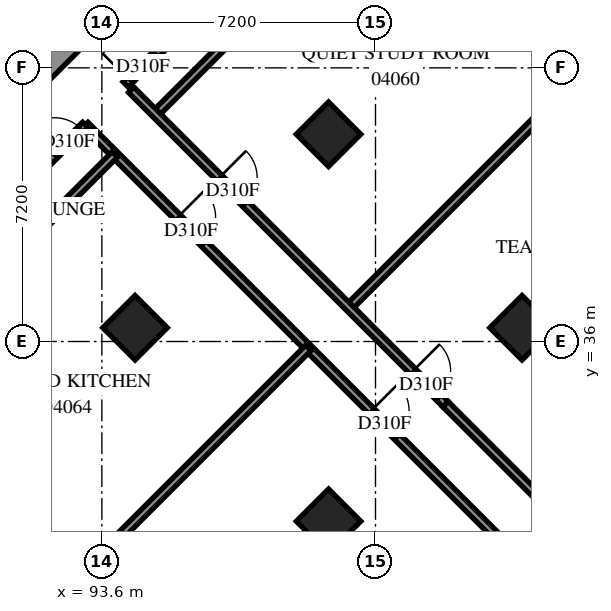
"""IFC4 building model, lengths in metres.
Left out: names, types, materials, properties, quantities, classifications, styles, units other than length and angle.
Written with IfcOpenShell. Run it as: python <this file> out.ifc"""

import sys

from ifc_helpers import new_model, si_unit, direction, frame, frame_2d, origin, origin_2d, place, context, subcontext, project, spatial, polyline, rectangle, outline, extrude, element, fill, save


model = new_model("IFC4")
c1 = context("Model", 3, precision=1e-05, world=origin(), true_north=direction((0.0, 1.0)))
c2 = subcontext(c1, "Body", "Model", "MODEL_VIEW")
j1 = project(units=[si_unit("LENGTHUNIT", "METRE"), si_unit("PLANEANGLEUNIT", "RADIAN")], contexts=[c1])
p1 = place(None, origin())
s1 = spatial("IfcSite", under=j1, at=p1, CompositionType="ELEMENT")
p2 = place(p1, origin())
s2 = spatial("IfcBuilding", under=s1, at=p2, CompositionType="ELEMENT")
p3 = place(p2, frame((0.0, 0.0, 18.6)))
s3 = spatial("IfcBuildingStorey", under=s2, at=p3, CompositionType="ELEMENT", Elevation=18.6)
for number, where, z_axis, x_axis in (
    (1, (99.565, 41.453, 0.0), (0.0, 0.0, 1.0), (0.707, -0.707, 0.0)),
    (2, (94.474, 36.362, 0.0), (0.0, 0.0, 1.0), (0.707, -0.707, 0.0)),
    (3, (104.656, 36.362, 0.0), (0.0, 0.0, 1.0), (0.707, -0.707, 0.0)),
    (4, (99.565, 31.271, 0.0), (0.0, 0.0, 1.0), (0.707, -0.707, 0.0)),
):
    element("IfcColumn", number, at=place(p3, frame(where, z_axis=z_axis, x_axis=x_axis)), inside=s3, PredefinedType="COLUMN", context=c2, shape_type="SweptSolid", body=[
        extrude(rectangle(XDim=1.2, YDim=1.2, at=origin_2d()), origin(), (0.0, 0.0, 1.0), 3.8),
    ])
p4 = place(p3, frame((87.19, 38.554, -0.4), z_axis=(0.0, 0.0, 1.0), x_axis=(0.707103309, 0.7071102534, 0.0)))
e5 = element("IfcWall", 5, at=p4, inside=s3, PredefinedType="SHEAR", context=c2, shape_type="SweptSolid", body=[
    extrude(rectangle(XDim=14.4, YDim=1.0, at=frame_2d((7.2, 0.0))), origin(), (0.0, 0.0, 1.0), 3.5),
])
p5 = place(p4, frame((4.55, 0.0, 0.4)))
e6 = element("IfcOpeningElement", 6, at=p5, cuts=e5, PredefinedType="OPENING", context=c2, shape_type="SweptSolid", body=[
    extrude(rectangle(XDim=1.1, YDim=2.1, at=frame_2d((0.55, 1.05))), frame((0.0, 0.51, 0.0), z_axis=(0.0, -1.0, 0.0), x_axis=(1.0, 0.0, 0.0)), (0.0, 0.0, 1.0), 1.02),
])
p6 = place(p4, frame((11.35, 0.0, 0.4)))
e7 = element("IfcOpeningElement", 7, at=p6, cuts=e5, PredefinedType="OPENING", context=c2, shape_type="SweptSolid", body=[
    extrude(rectangle(XDim=1.1, YDim=2.1, at=frame_2d((0.55, 1.05))), frame((0.0, 0.51, 0.0), z_axis=(0.0, -1.0, 0.0), x_axis=(1.0, 0.0, 0.0)), (0.0, 0.0, 1.0), 1.02),
])
p7 = place(p3, frame((117.843, 34.665, 0.0), z_axis=(0.0, 0.0, 1.0), x_axis=(-0.7071067812, 0.7071067812, 0.0)))
e8 = element("IfcWall", 8, at=p7, inside=s3, PredefinedType="SOLIDWALL", context=c2, shape_type="SweptSolid", body=[
    extrude(outline(polyline([(-0.275, -0.275), (54.222, -0.275), (53.994, 0.275), (0.275, 0.275), (-0.275, -0.275)])), origin(), (0.0, 0.0, 1.0), 3.8),
])
p8 = place(p7, frame((0.8, 0.0, 0.7)))
e9 = element("IfcOpeningElement", 9, at=p8, cuts=e8, PredefinedType="OPENING", context=c2, shape_type="SweptSolid", body=[
    extrude(rectangle(XDim=1.8, YDim=2.4, at=frame_2d((0.9, 1.2))), frame((0.0, 0.285, 0.0), z_axis=(0.0, -1.0, 0.0), x_axis=(1.0, 0.0, 0.0)), (0.0, 0.0, 1.0), 0.57),
])
p9 = place(p7, frame((4.225, 0.0, 0.7)))
e10 = element("IfcOpeningElement", 10, at=p9, cuts=e8, PredefinedType="OPENING", context=c2, shape_type="SweptSolid", body=[
    extrude(rectangle(XDim=1.8, YDim=2.4, at=frame_2d((0.9, 1.2))), frame((0.0, 0.285, 0.0), z_axis=(0.0, -1.0, 0.0), x_axis=(1.0, 0.0, 0.0)), (0.0, 0.0, 1.0), 0.57),
])
p10 = place(p7, frame((7.825, 0.0, 0.7)))
e11 = element("IfcOpeningElement", 11, at=p10, cuts=e8, PredefinedType="OPENING", context=c2, shape_type="SweptSolid", body=[
    extrude(rectangle(XDim=1.8, YDim=2.4, at=frame_2d((0.9, 1.2))), frame((0.0, 0.285, 0.0), z_axis=(0.0, -1.0, 0.0), x_axis=(1.0, 0.0, 0.0)), (0.0, 0.0, 1.0), 0.57),
])
p11 = place(p7, frame((11.425, 0.0, 0.7)))
e12 = element("IfcOpeningElement", 12, at=p11, cuts=e8, PredefinedType="OPENING", context=c2, shape_type="SweptSolid", body=[
    extrude(rectangle(XDim=1.8, YDim=2.4, at=frame_2d((0.9, 1.2))), frame((0.0, 0.285, 0.0), z_axis=(0.0, -1.0, 0.0), x_axis=(1.0, 0.0, 0.0)), (0.0, 0.0, 1.0), 0.57),
])
p12 = place(p7, frame((15.025, 0.0, 0.7)))
e13 = element("IfcOpeningElement", 13, at=p12, cuts=e8, PredefinedType="OPENING", context=c2, shape_type="SweptSolid", body=[
    extrude(rectangle(XDim=1.8, YDim=2.4, at=frame_2d((0.9, 1.2))), frame((0.0, 0.285, 0.0), z_axis=(0.0, -1.0, 0.0), x_axis=(1.0, 0.0, 0.0)), (0.0, 0.0, 1.0), 0.57),
])
p13 = place(p7, frame((18.625, 0.0, 0.7)))
e14 = element("IfcOpeningElement", 14, at=p13, cuts=e8, PredefinedType="OPENING", context=c2, shape_type="SweptSolid", body=[
    extrude(rectangle(XDim=1.8, YDim=2.4, at=frame_2d((0.9, 1.2))), frame((0.0, 0.285, 0.0), z_axis=(0.0, -1.0, 0.0), x_axis=(1.0, 0.0, 0.0)), (0.0, 0.0, 1.0), 0.57),
])
p14 = place(p7, frame((22.225, 0.0, 0.7)))
e15 = element("IfcOpeningElement", 15, at=p14, cuts=e8, PredefinedType="OPENING", context=c2, shape_type="SweptSolid", body=[
    extrude(rectangle(XDim=1.8, YDim=2.4, at=frame_2d((0.9, 1.2))), frame((0.0, 0.285, 0.0), z_axis=(0.0, -1.0, 0.0), x_axis=(1.0, 0.0, 0.0)), (0.0, 0.0, 1.0), 0.57),
])
p15 = place(p7, frame((25.825, 0.0, 0.7)))
e16 = element("IfcOpeningElement", 16, at=p15, cuts=e8, PredefinedType="OPENING", context=c2, shape_type="SweptSolid", body=[
    extrude(rectangle(XDim=1.8, YDim=2.4, at=frame_2d((0.9, 1.2))), frame((0.0, 0.285, 0.0), z_axis=(0.0, -1.0, 0.0), x_axis=(1.0, 0.0, 0.0)), (0.0, 0.0, 1.0), 0.57),
])
p16 = place(p7, frame((29.425, 0.0, 0.7)))
e17 = element("IfcOpeningElement", 17, at=p16, cuts=e8, PredefinedType="OPENING", context=c2, shape_type="SweptSolid", body=[
    extrude(rectangle(XDim=1.8, YDim=2.4, at=frame_2d((0.9, 1.2))), frame((0.0, 0.285, 0.0), z_axis=(0.0, -1.0, 0.0), x_axis=(1.0, 0.0, 0.0)), (0.0, 0.0, 1.0), 0.57),
])
p17 = place(p7, frame((33.025, 0.0, 0.7)))
e18 = element("IfcOpeningElement", 18, at=p17, cuts=e8, PredefinedType="OPENING", context=c2, shape_type="SweptSolid", body=[
    extrude(rectangle(XDim=1.8, YDim=2.4, at=frame_2d((0.9, 1.2))), frame((0.0, 0.285, 0.0), z_axis=(0.0, -1.0, 0.0), x_axis=(1.0, 0.0, 0.0)), (0.0, 0.0, 1.0), 0.57),
])
p18 = place(p7, frame((36.625, 0.0, 0.7)))
e19 = element("IfcOpeningElement", 19, at=p18, cuts=e8, PredefinedType="OPENING", context=c2, shape_type="SweptSolid", body=[
    extrude(rectangle(XDim=1.8, YDim=2.4, at=frame_2d((0.9, 1.2))), frame((0.0, 0.285, 0.0), z_axis=(0.0, -1.0, 0.0), x_axis=(1.0, 0.0, 0.0)), (0.0, 0.0, 1.0), 0.57),
])
p19 = place(p7, frame((40.225, 0.0, 0.7)))
e20 = element("IfcOpeningElement", 20, at=p19, cuts=e8, PredefinedType="OPENING", context=c2, shape_type="SweptSolid", body=[
    extrude(rectangle(XDim=1.8, YDim=2.4, at=frame_2d((0.9, 1.2))), frame((0.0, 0.285, 0.0), z_axis=(0.0, -1.0, 0.0), x_axis=(1.0, 0.0, 0.0)), (0.0, 0.0, 1.0), 0.57),
])
p20 = place(p7, frame((43.825, 0.0, 0.7)))
e21 = element("IfcOpeningElement", 21, at=p20, cuts=e8, PredefinedType="OPENING", context=c2, shape_type="SweptSolid", body=[
    extrude(rectangle(XDim=1.8, YDim=2.4, at=frame_2d((0.9, 1.2))), frame((0.0, 0.285, 0.0), z_axis=(0.0, -1.0, 0.0), x_axis=(1.0, 0.0, 0.0)), (0.0, 0.0, 1.0), 0.57),
])
p21 = place(p7, frame((47.425, 0.0, 0.7)))
e22 = element("IfcOpeningElement", 22, at=p21, cuts=e8, PredefinedType="OPENING", context=c2, shape_type="SweptSolid", body=[
    extrude(rectangle(XDim=1.8, YDim=2.4, at=frame_2d((0.9, 1.2))), frame((0.0, 0.285, 0.0), z_axis=(0.0, -1.0, 0.0), x_axis=(1.0, 0.0, 0.0)), (0.0, 0.0, 1.0), 0.57),
])
p22 = place(p7, frame((51.06, 0.0, 0.7)))
e23 = element("IfcOpeningElement", 23, at=p22, cuts=e8, PredefinedType="OPENING", context=c2, shape_type="SweptSolid", body=[
    extrude(rectangle(XDim=1.8, YDim=2.4, at=frame_2d((0.9, 1.2))), frame((0.0, 0.285, 0.0), z_axis=(0.0, -1.0, 0.0), x_axis=(1.0, 0.0, 0.0)), (0.0, 0.0, 1.0), 0.57),
])
p23 = place(p3, frame((77.07, 42.275, 0.0), z_axis=(0.0, 0.0, 1.0), x_axis=(0.7071067812, -0.7071067812, 0.0)))
e24 = element("IfcWall", 24, at=p23, inside=s3, PredefinedType="SOLIDWALL", context=c2, shape_type="SweptSolid", body=[
    extrude(outline(polyline([(0.114, -0.275), (39.288, -0.275), (38.737, 0.275), (-0.114, 0.275), (0.114, -0.275)])), origin(), (0.0, 0.0, 1.0), 3.8),
])
p24 = place(p23, frame((2.837, 0.0, 0.7)))
e25 = element("IfcOpeningElement", 25, at=p24, cuts=e24, PredefinedType="OPENING", context=c2, shape_type="SweptSolid", body=[
    extrude(rectangle(XDim=1.8, YDim=2.4, at=frame_2d((0.9, 1.2))), frame((0.0, 0.285, 0.0), z_axis=(0.0, -1.0, 0.0), x_axis=(1.0, 0.0, 0.0)), (0.0, 0.0, 1.0), 0.57),
])
p25 = place(p23, frame((6.588, 0.0, 0.7)))
e26 = element("IfcOpeningElement", 26, at=p25, cuts=e24, PredefinedType="OPENING", context=c2, shape_type="SweptSolid", body=[
    extrude(rectangle(XDim=1.8, YDim=2.4, at=frame_2d((0.9, 1.2))), frame((0.0, 0.285, 0.0), z_axis=(0.0, -1.0, 0.0), x_axis=(1.0, 0.0, 0.0)), (0.0, 0.0, 1.0), 0.57),
])
p26 = place(p23, frame((10.188, 0.0, 0.7)))
e27 = element("IfcOpeningElement", 27, at=p26, cuts=e24, PredefinedType="OPENING", context=c2, shape_type="SweptSolid", body=[
    extrude(rectangle(XDim=1.8, YDim=2.4, at=frame_2d((0.9, 1.2))), frame((0.0, 0.285, 0.0), z_axis=(0.0, -1.0, 0.0), x_axis=(1.0, 0.0, 0.0)), (0.0, 0.0, 1.0), 0.57),
])
p27 = place(p23, frame((13.787, 0.0, 0.7)))
e28 = element("IfcOpeningElement", 28, at=p27, cuts=e24, PredefinedType="OPENING", context=c2, shape_type="SweptSolid", body=[
    extrude(rectangle(XDim=1.8, YDim=2.4, at=frame_2d((0.9, 1.2))), frame((0.0, 0.285, 0.0), z_axis=(0.0, -1.0, 0.0), x_axis=(1.0, 0.0, 0.0)), (0.0, 0.0, 1.0), 0.57),
])
p28 = place(p23, frame((17.387, 0.0, 0.7)))
e29 = element("IfcOpeningElement", 29, at=p28, cuts=e24, PredefinedType="OPENING", context=c2, shape_type="SweptSolid", body=[
    extrude(rectangle(XDim=1.8, YDim=2.4, at=frame_2d((0.9, 1.2))), frame((0.0, 0.285, 0.0), z_axis=(0.0, -1.0, 0.0), x_axis=(1.0, 0.0, 0.0)), (0.0, 0.0, 1.0), 0.57),
])
p29 = place(p23, frame((20.988, 0.0, 0.7)))
e30 = element("IfcOpeningElement", 30, at=p29, cuts=e24, PredefinedType="OPENING", context=c2, shape_type="SweptSolid", body=[
    extrude(rectangle(XDim=1.8, YDim=2.4, at=frame_2d((0.9, 1.2))), frame((0.0, 0.285, 0.0), z_axis=(0.0, -1.0, 0.0), x_axis=(1.0, 0.0, 0.0)), (0.0, 0.0, 1.0), 0.57),
])
p30 = place(p23, frame((24.587, 0.0, 0.7)))
e31 = element("IfcOpeningElement", 31, at=p30, cuts=e24, PredefinedType="OPENING", context=c2, shape_type="SweptSolid", body=[
    extrude(rectangle(XDim=1.8, YDim=2.4, at=frame_2d((0.9, 1.2))), frame((0.0, 0.285, 0.0), z_axis=(0.0, -1.0, 0.0), x_axis=(1.0, 0.0, 0.0)), (0.0, 0.0, 1.0), 0.57),
])
p31 = place(p23, frame((28.188, 0.0, 0.7)))
e32 = element("IfcOpeningElement", 32, at=p31, cuts=e24, PredefinedType="OPENING", context=c2, shape_type="SweptSolid", body=[
    extrude(rectangle(XDim=1.8, YDim=2.4, at=frame_2d((0.9, 1.2))), frame((0.0, 0.285, 0.0), z_axis=(0.0, -1.0, 0.0), x_axis=(1.0, 0.0, 0.0)), (0.0, 0.0, 1.0), 0.57),
])
p32 = place(p23, frame((31.788, 0.0, 0.7)))
e33 = element("IfcOpeningElement", 33, at=p32, cuts=e24, PredefinedType="OPENING", context=c2, shape_type="SweptSolid", body=[
    extrude(rectangle(XDim=1.8, YDim=2.4, at=frame_2d((0.9, 1.2))), frame((0.0, 0.285, 0.0), z_axis=(0.0, -1.0, 0.0), x_axis=(1.0, 0.0, 0.0)), (0.0, 0.0, 1.0), 0.57),
])
p33 = place(p23, frame((35.388, 0.0, 0.7)))
e34 = element("IfcOpeningElement", 34, at=p33, cuts=e24, PredefinedType="OPENING", context=c2, shape_type="SweptSolid", body=[
    extrude(rectangle(XDim=1.8, YDim=2.4, at=frame_2d((0.9, 1.2))), frame((0.0, 0.285, 0.0), z_axis=(0.0, -1.0, 0.0), x_axis=(1.0, 0.0, 0.0)), (0.0, 0.0, 1.0), 0.57),
])
p34 = place(p3, frame((93.163, 41.697, 0.0), z_axis=(0.0, 0.0, 1.0), x_axis=(0.7071067812, -0.7071067812, 0.0)))
e35 = element("IfcWall", 35, at=p34, inside=s3, PredefinedType="PARTITIONING", context=c2, shape_type="SweptSolid", body=[
    extrude(rectangle(XDim=26.299, YDim=0.2, at=frame_2d((13.149, 0.0))), origin(), (0.0, 0.0, 1.0), 3.8),
])
p35 = place(p34, frame((3.437, 0.0, 0.0)))
e36 = element("IfcOpeningElement", 36, at=p35, cuts=e35, PredefinedType="OPENING", context=c2, shape_type="SweptSolid", body=[
    extrude(rectangle(XDim=1.0, YDim=2.1, at=frame_2d((0.5, 1.05))), frame((0.0, 0.11, 0.0), z_axis=(0.0, -1.0, 0.0), x_axis=(1.0, 0.0, 0.0)), (0.0, 0.0, 1.0), 0.22),
])
p36 = place(p34, frame((10.637, 0.0, 0.0)))
e37 = element("IfcOpeningElement", 37, at=p36, cuts=e35, PredefinedType="OPENING", context=c2, shape_type="SweptSolid", body=[
    extrude(rectangle(XDim=1.0, YDim=2.1, at=frame_2d((0.5, 1.05))), frame((0.0, 0.11, 0.0), z_axis=(0.0, -1.0, 0.0), x_axis=(1.0, 0.0, 0.0)), (0.0, 0.0, 1.0), 0.22),
])
p37 = place(p34, frame((16.024, 0.0, 0.0)))
e38 = element("IfcOpeningElement", 38, at=p37, cuts=e35, PredefinedType="OPENING", context=c2, shape_type="SweptSolid", body=[
    extrude(rectangle(XDim=1.0, YDim=2.1, at=frame_2d((0.5, 1.05))), frame((0.0, 0.11, 0.0), z_axis=(0.0, -1.0, 0.0), x_axis=(1.0, 0.0, 0.0)), (0.0, 0.0, 1.0), 0.22),
])
p38 = place(p34, frame((22.657, 0.0, 0.0)))
e39 = element("IfcOpeningElement", 39, at=p38, cuts=e35, PredefinedType="OPENING", context=c2, shape_type="SweptSolid", body=[
    extrude(rectangle(XDim=1.0, YDim=2.1, at=frame_2d((0.5, 1.05))), frame((0.0, 0.11, 0.0), z_axis=(0.0, -1.0, 0.0), x_axis=(1.0, 0.0, 0.0)), (0.0, 0.0, 1.0), 0.22),
])
p39 = place(p3, frame((110.281, 26.713, 0.0), z_axis=(0.0, 0.0, 1.0), x_axis=(-0.7072363947, 0.7069771439, 0.0)))
e40 = element("IfcWall", 40, at=p39, inside=s3, PredefinedType="PARTITIONING", context=c2, shape_type="SweptSolid", body=[
    extrude(rectangle(XDim=10.8, YDim=0.2, at=frame_2d((5.4, 0.0))), origin(), (0.0, 0.0, 1.0), 3.8),
])
p40 = place(p39, frame((3.827, 0.0, 0.0)))
e41 = element("IfcOpeningElement", 41, at=p40, cuts=e40, PredefinedType="OPENING", context=c2, shape_type="SweptSolid", body=[
    extrude(rectangle(XDim=1.0, YDim=2.1, at=frame_2d((0.5, 1.05))), frame((0.0, 0.11, 0.0), z_axis=(0.0, -1.0, 0.0), x_axis=(1.0, 0.0, 0.0)), (0.0, 0.0, 1.0), 0.22),
])
p41 = place(p3, frame((86.376, 33.357, 0.0), z_axis=(0.0, 0.0, 1.0), x_axis=(0.7071021083, 0.707111454, 0.0)))
e42 = element("IfcWall", 42, at=p41, inside=s3, PredefinedType="PARTITIONING", context=c2, shape_type="SweptSolid", body=[
    extrude(rectangle(XDim=10.7, YDim=0.2, at=frame_2d((5.35, 0.0))), origin(), (0.0, 0.0, 1.0), 3.8),
])
p42 = place(p3, frame((91.468, 28.266, 0.0), z_axis=(0.0, 0.0, 1.0), x_axis=(0.7071067812, 0.7071067812, 0.0)))
e43 = element("IfcWall", 43, at=p42, inside=s3, PredefinedType="PARTITIONING", context=c2, shape_type="SweptSolid", body=[
    extrude(rectangle(XDim=10.7, YDim=0.2, at=frame_2d((5.35, 0.0))), origin(), (0.0, 0.0, 1.0), 3.8),
])
for number, where, z_axis, x_axis in (
    (44, (95.003, 41.985, 0.0), (0.0, 0.0, 1.0), (0.707, 0.707, 0.0)),
    (45, (100.095, 36.893, 0.0), (0.0, 0.0, 1.0), (0.707, 0.707, 0.0)),
):
    element("IfcWall", number, at=place(p3, frame(where, z_axis=z_axis, x_axis=x_axis)), inside=s3, PredefinedType="PARTITIONING", context=c2, shape_type="SweptSolid", body=[
        extrude(rectangle(XDim=10.699, YDim=0.2, at=frame_2d((5.35, 0.0))), origin(), (0.0, 0.0, 1.0), 3.8),
    ])
p43 = place(p3, frame((86.836, 35.372, 0.0), z_axis=(0.0, 0.0, 1.0), x_axis=(0.7071067812, 0.7071067812, 0.0)))
e46 = element("IfcWall", 46, at=p43, inside=s3, PredefinedType="PARTITIONING", context=c2, shape_type="SweptSolid", body=[
    extrude(rectangle(XDim=8.949, YDim=0.2, at=frame_2d((4.474, 0.0))), origin(), (0.0, 0.0, 1.0), 3.8),
])
p44 = place(p43, frame((7.8, 0.0, 0.0)))
e47 = element("IfcOpeningElement", 47, at=p44, cuts=e46, PredefinedType="OPENING", context=c2, shape_type="SweptSolid", body=[
    extrude(rectangle(XDim=1.0, YDim=2.1, at=frame_2d((0.5, 1.05))), frame((0.0, 0.11, 0.0), z_axis=(0.0, -1.0, 0.0), x_axis=(1.0, 0.0, 0.0)), (0.0, 0.0, 1.0), 0.22),
])
p45 = place(p3, frame((94.226, 42.762, 0.0), z_axis=(0.0, 0.0, 1.0), x_axis=(0.7071067812, 0.7071067812, 0.0)))
e48 = element("IfcWall", 48, at=p45, inside=s3, PredefinedType="PARTITIONING", context=c2, shape_type="SweptSolid", body=[
    extrude(rectangle(XDim=8.949, YDim=0.2, at=frame_2d((4.474, 0.0))), origin(), (0.0, 0.0, 1.0), 3.8),
])
p46 = place(p45, frame((0.149, 0.0, 0.0)))
e49 = element("IfcOpeningElement", 49, at=p46, cuts=e48, PredefinedType="OPENING", context=c2, shape_type="SweptSolid", body=[
    extrude(rectangle(XDim=1.0, YDim=2.1, at=frame_2d((0.5, 1.05))), frame((0.0, 0.11, 0.0), z_axis=(0.0, -1.0, 0.0), x_axis=(1.0, 0.0, 0.0)), (0.0, 0.0, 1.0), 0.22),
])
p47 = place(p3, frame((94.371, 42.623, 0.0), z_axis=(0.0, 0.0, 1.0), x_axis=(0.7071067812, -0.7071067812, 0.0)))
e50 = element("IfcWall", 50, at=p47, inside=s3, PredefinedType="PARTITIONING", context=c2, shape_type="SweptSolid", body=[
    extrude(outline(polyline([(0.0, -0.1), (11.7, -0.1), (11.7, 0.1), (0.0, 0.1), (0.0, -0.1)])), origin(), (0.0, 0.0, 1.0), 3.8),
])
p48 = place(p47, frame((3.274, 0.0, 0.0)))
e51 = element("IfcOpeningElement", 51, at=p48, cuts=e50, PredefinedType="OPENING", context=c2, shape_type="SweptSolid", body=[
    extrude(rectangle(XDim=1.0, YDim=2.1, at=frame_2d((0.5, 1.05))), frame((0.0, 0.11, 0.0), z_axis=(0.0, -1.0, 0.0), x_axis=(1.0, 0.0, 0.0)), (0.0, 0.0, 1.0), 0.22),
])
p49 = place(p47, frame((10.473, 0.0, 0.0)))
e52 = element("IfcOpeningElement", 52, at=p49, cuts=e50, PredefinedType="OPENING", context=c2, shape_type="SweptSolid", body=[
    extrude(rectangle(XDim=1.0, YDim=2.1, at=frame_2d((0.5, 1.05))), frame((0.0, 0.11, 0.0), z_axis=(0.0, -1.0, 0.0), x_axis=(1.0, 0.0, 0.0)), (0.0, 0.0, 1.0), 0.22),
])
p50 = place(p46, origin())
e53 = element("IfcDoor", 53, at=p50, inside=s3, OperationType="SINGLE_SWING_LEFT", PredefinedType="DOOR", context=c2, shape_type="SweptSolid", body=[
    extrude(rectangle(XDim=1.0, YDim=2.1, at=frame_2d((0.5, 1.05))), frame((0.0, 0.025, 0.0), z_axis=(0.0, -1.0, 0.0), x_axis=(1.0, 0.0, 0.0)), (0.0, 0.0, 1.0), 0.05),
])
fill(e49, e53)
p51 = place(p48, origin())
e54 = element("IfcDoor", 54, at=p51, inside=s3, OperationType="SINGLE_SWING_RIGHT", PredefinedType="DOOR", context=c2, shape_type="SweptSolid", body=[
    extrude(rectangle(XDim=1.0, YDim=2.1, at=frame_2d((0.5, 1.05))), frame((0.0, 0.025, 0.0), z_axis=(0.0, -1.0, 0.0), x_axis=(1.0, 0.0, 0.0)), (0.0, 0.0, 1.0), 0.05),
])
fill(e51, e54)
p52 = place(p49, origin())
e55 = element("IfcDoor", 55, at=p52, inside=s3, OperationType="SINGLE_SWING_RIGHT", PredefinedType="DOOR", context=c2, shape_type="SweptSolid", body=[
    extrude(rectangle(XDim=1.0, YDim=2.1, at=frame_2d((0.5, 1.05))), frame((0.0, 0.025, 0.0), z_axis=(0.0, -1.0, 0.0), x_axis=(1.0, 0.0, 0.0)), (0.0, 0.0, 1.0), 0.05),
])
fill(e52, e55)
p53 = place(p44, origin())
e56 = element("IfcDoor", 56, at=p53, inside=s3, OperationType="SINGLE_SWING_RIGHT", PredefinedType="DOOR", context=c2, shape_type="SweptSolid", body=[
    extrude(rectangle(XDim=1.0, YDim=2.1, at=frame_2d((0.5, 1.05))), frame((0.0, 0.025, 0.0), z_axis=(0.0, -1.0, 0.0), x_axis=(1.0, 0.0, 0.0)), (0.0, 0.0, 1.0), 0.05),
])
fill(e47, e56)
p54 = place(p35, origin())
e57 = element("IfcDoor", 57, at=p54, inside=s3, OperationType="SINGLE_SWING_LEFT", PredefinedType="DOOR", context=c2, shape_type="SweptSolid", body=[
    extrude(rectangle(XDim=1.0, YDim=2.1, at=frame_2d((0.5, 1.05))), frame((0.0, 0.025, 0.0), z_axis=(0.0, -1.0, 0.0), x_axis=(1.0, 0.0, 0.0)), (0.0, 0.0, 1.0), 0.05),
])
fill(e36, e57)
p55 = place(p36, origin())
e58 = element("IfcDoor", 58, at=p55, inside=s3, OperationType="SINGLE_SWING_LEFT", PredefinedType="DOOR", context=c2, shape_type="SweptSolid", body=[
    extrude(rectangle(XDim=1.0, YDim=2.1, at=frame_2d((0.5, 1.05))), frame((0.0, 0.025, 0.0), z_axis=(0.0, -1.0, 0.0), x_axis=(1.0, 0.0, 0.0)), (0.0, 0.0, 1.0), 0.05),
])
fill(e37, e58)
save(model, sys.argv[1])
